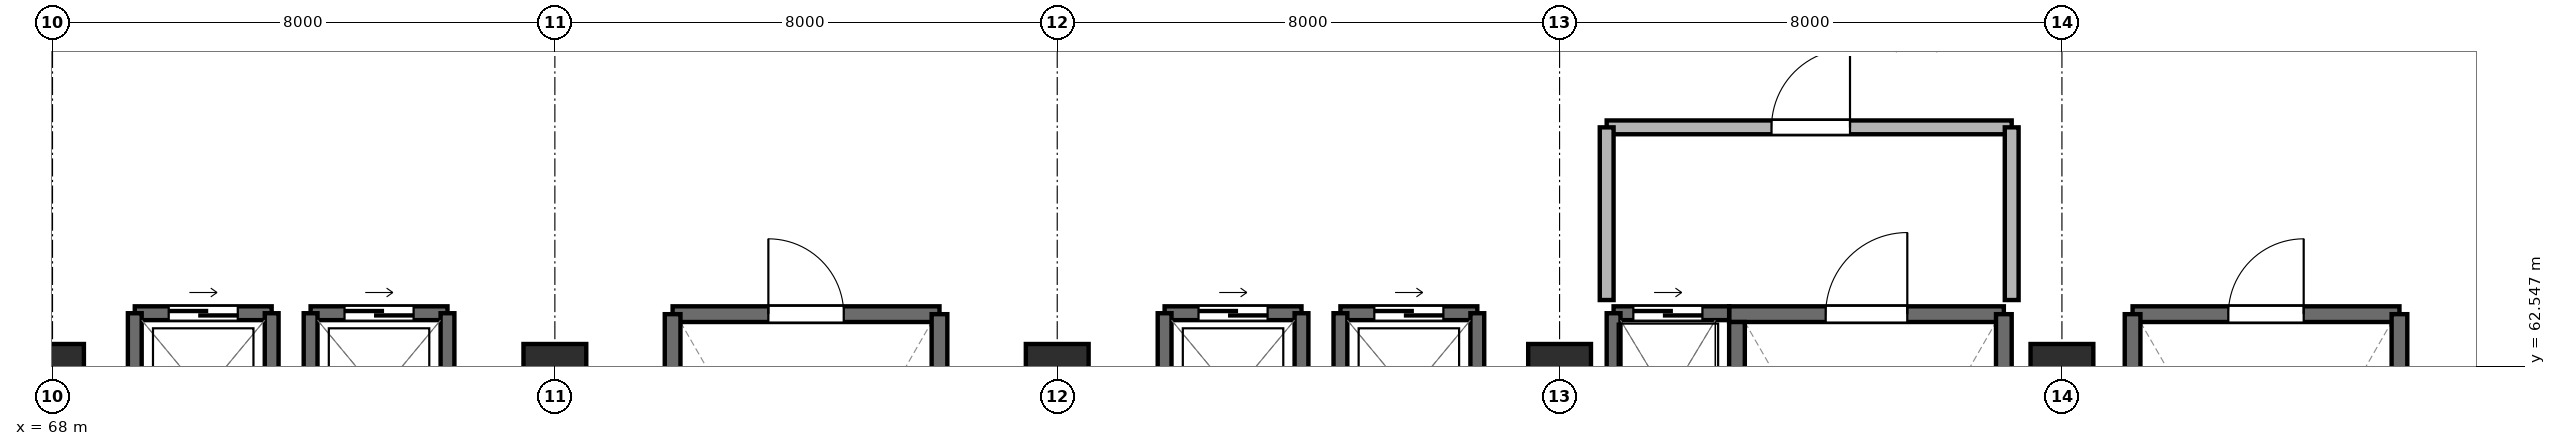
"""IFC4 building model, lengths in metres.
Left out: names, types, materials, properties, quantities, classifications, styles, units other than length and angle.
Written with IfcOpenShell. Run it as: python <this file> out.ifc"""

import sys

from ifc_helpers import new_model, si_unit, direction, frame, frame_2d, origin, origin_2d, place, context, subcontext, project, spatial, rectangle, extrude, element, fill, save


model = new_model("IFC4")
c1 = context("Model", 3, precision=1e-05, world=origin(), true_north=direction((0.0, 1.0)))
c2 = subcontext(c1, "Body", "Model", "MODEL_VIEW")
j1 = project(units=[si_unit("LENGTHUNIT", "METRE"), si_unit("PLANEANGLEUNIT", "RADIAN")], contexts=[c1])
p1 = place(None, origin())
s1 = spatial("IfcSite", under=j1, at=p1, CompositionType="ELEMENT")
p2 = place(p1, origin())
s2 = spatial("IfcBuilding", under=s1, at=p2, CompositionType="ELEMENT")
p3 = place(p2, origin())
s3 = spatial("IfcBuildingStorey", under=s2, at=p3, CompositionType="ELEMENT", Elevation=0.0)
for number, where, z_axis, x_axis in (
    (1, (68.0, 62.4, -0.35), (0.0, 0.0, 1.0), (1.0, 0.0, 0.0)),
    (2, (76.0, 62.4, -0.35), (0.0, 0.0, 1.0), (1.0, 0.0, 0.0)),
    (3, (84.0, 62.4, -0.35), (0.0, 0.0, 1.0), (1.0, 0.0, 0.0)),
    (4, (92.0, 62.4, -0.35), (0.0, 0.0, 1.0), (1.0, 0.0, 0.0)),
    (5, (100.0, 62.4, -0.35), (0.0, 0.0, 1.0), (1.0, 0.0, 0.0)),
):
    element("IfcColumn", number, at=place(p3, frame(where, z_axis=z_axis, x_axis=x_axis)), inside=s3, PredefinedType="COLUMN", context=c2, shape_type="SweptSolid", body=[
        extrude(rectangle(XDim=1.0, YDim=1.0, at=origin_2d()), origin(), (0.0, 0.0, 1.0), 4.65),
    ])
p4 = place(p3, frame((99.075, 63.375, 0.0), z_axis=(0.0, 0.0, 1.0), x_axis=(-1.0, 0.0, 0.0)))
e6 = element("IfcWall", 6, at=p4, inside=s3, PredefinedType="SHEAR", context=c2, shape_type="SweptSolid", body=[
    extrude(rectangle(XDim=4.375, YDim=0.25, at=frame_2d((2.188, 0.0))), origin(), (0.0, 0.0, 1.0), 4.3),
])
p5 = place(p4, frame((1.538, 0.0, 0.0)))
e7 = element("IfcOpeningElement", 7, at=p5, cuts=e6, PredefinedType="OPENING", context=c2, shape_type="SweptSolid", body=[
    extrude(rectangle(XDim=1.3, YDim=2.2, at=frame_2d((0.65, 1.1))), frame((0.0, 0.137, 0.0), z_axis=(0.0, -1.0, 0.0), x_axis=(1.0, 0.0, 0.0)), (0.0, 0.0, 1.0), 0.274),
])
p6 = place(p3, frame((94.825, 63.25, 0.0), z_axis=(0.0, 0.0, 1.0), x_axis=(0.0, -1.0, 0.0)))
e8 = element("IfcWall", 8, at=p6, inside=s3, PredefinedType="SHEAR", context=c2, shape_type="SweptSolid", body=[
    extrude(rectangle(XDim=7.075, YDim=0.25, at=frame_2d((3.538, 0.0))), origin(), (0.0, 0.0, 1.0), 4.3),
])
p7 = place(p3, frame((99.075, 56.175, 0.0), z_axis=(0.0, 0.0, 1.0), x_axis=(0.0, 1.0, 0.0)))
e9 = element("IfcWall", 9, at=p7, inside=s3, PredefinedType="SHEAR", context=c2, shape_type="SweptSolid", body=[
    extrude(rectangle(XDim=7.2, YDim=0.25, at=frame_2d((3.6, 0.0))), origin(), (0.0, 0.0, 1.0), 4.3),
])
p8 = place(p3, frame((82.125, 63.375, 0.0), z_axis=(0.0, 0.0, 1.0), x_axis=(-1.0, 0.0, 0.0)))
e10 = element("IfcWall", 10, at=p8, inside=s3, PredefinedType="SHEAR", context=c2, shape_type="SweptSolid", body=[
    extrude(rectangle(XDim=4.25, YDim=0.25, at=frame_2d((2.125, 0.0))), origin(), (0.0, 0.0, 1.0), 4.3),
])
p9 = place(p8, frame((1.525, 0.0, 0.0)))
e11 = element("IfcOpeningElement", 11, at=p9, cuts=e10, PredefinedType="OPENING", context=c2, shape_type="SweptSolid", body=[
    extrude(rectangle(XDim=1.2, YDim=2.2, at=frame_2d((0.6, 1.1))), frame((0.0, 0.137, 0.0), z_axis=(0.0, -1.0, 0.0), x_axis=(1.0, 0.0, 0.0)), (0.0, 0.0, 1.0), 0.274),
])
for number, where, z_axis, x_axis in (
    (12, (77.875, 63.375, 0.0), (0.0, 0.0, 1.0), (0.0, -1.0, 0.0)),
    (13, (82.125, 56.175, 0.0), (0.0, 0.0, 1.0), (0.0, 1.0, 0.0)),
):
    element("IfcWall", number, at=place(p3, frame(where, z_axis=z_axis, x_axis=x_axis)), inside=s3, PredefinedType="SHEAR", context=c2, shape_type="SweptSolid", body=[
        extrude(rectangle(XDim=7.2, YDim=0.25, at=frame_2d((3.6, 0.0))), origin(), (0.0, 0.0, 1.0), 4.3),
    ])
p10 = place(p3, frame((105.375, 63.375, 0.0), z_axis=(0.0, 0.0, 1.0), x_axis=(-1.0, 0.0, 0.0)))
e14 = element("IfcWall", 14, at=p10, inside=s3, PredefinedType="SHEAR", context=c2, shape_type="SweptSolid", body=[
    extrude(rectangle(XDim=4.25, YDim=0.25, at=frame_2d((2.125, 0.0))), origin(), (0.0, 0.0, 1.0), 4.3),
])
p11 = place(p10, frame((1.525, 0.0, 0.0)))
e15 = element("IfcOpeningElement", 15, at=p11, cuts=e14, PredefinedType="OPENING", context=c2, shape_type="SweptSolid", body=[
    extrude(rectangle(XDim=1.2, YDim=2.2, at=frame_2d((0.6, 1.1))), frame((0.0, 0.137, 0.0), z_axis=(0.0, -1.0, 0.0), x_axis=(1.0, 0.0, 0.0)), (0.0, 0.0, 1.0), 0.274),
])
for number, where, z_axis, x_axis in (
    (16, (101.125, 63.375, 0.0), (0.0, 0.0, 1.0), (0.0, -1.0, 0.0)),
    (17, (105.375, 56.175, 0.0), (0.0, 0.0, 1.0), (0.0, 1.0, 0.0)),
):
    element("IfcWall", number, at=place(p3, frame(where, z_axis=z_axis, x_axis=x_axis)), inside=s3, PredefinedType="SHEAR", context=c2, shape_type="SweptSolid", body=[
        extrude(rectangle(XDim=7.2, YDim=0.25, at=frame_2d((3.6, 0.0))), origin(), (0.0, 0.0, 1.0), 4.3),
    ])
p12 = place(p3, frame((94.7, 63.39, 0.0), z_axis=(0.0, 0.0, 1.0), x_axis=(-1.0, 0.0, 0.0)))
e18 = element("IfcWall", 18, at=p12, inside=s3, PredefinedType="SHEAR", context=c2, shape_type="SweptSolid", body=[
    extrude(rectangle(XDim=1.84, YDim=0.22, at=frame_2d((0.92, 0.0))), origin(), (0.0, 0.0, 1.0), 4.3),
])
p13 = place(p12, frame((0.425, 0.0, 0.0)))
e19 = element("IfcOpeningElement", 19, at=p13, cuts=e18, PredefinedType="OPENING", context=c2, shape_type="SweptSolid", body=[
    extrude(rectangle(XDim=1.1, YDim=2.2, at=frame_2d((0.55, 1.1))), frame((0.0, 0.122, 0.0), z_axis=(0.0, -1.0, 0.0), x_axis=(1.0, 0.0, 0.0)), (0.0, 0.0, 1.0), 0.244),
])
p14 = place(p3, frame((92.86, 63.39, 0.0), z_axis=(0.0, 0.0, 1.0), x_axis=(0.0, -1.0, 0.0)))
e20 = element("IfcWall", 20, at=p14, inside=s3, PredefinedType="SHEAR", context=c2, shape_type="SweptSolid", body=[
    extrude(rectangle(XDim=2.73, YDim=0.22, at=frame_2d((1.365, 0.0))), origin(), (0.0, 0.0, 1.0), 4.3),
])
p15 = place(p3, frame((71.49, 63.39, 0.0), z_axis=(0.0, 0.0, 1.0), x_axis=(-1.0, 0.0, 0.0)))
e21 = element("IfcWall", 21, at=p15, inside=s3, PredefinedType="SHEAR", context=c2, shape_type="SweptSolid", body=[
    extrude(rectangle(XDim=2.18, YDim=0.22, at=frame_2d((1.09, 0.0))), origin(), (0.0, 0.0, 1.0), 4.3),
])
p16 = place(p15, frame((0.54, 0.0, 0.0)))
e22 = element("IfcOpeningElement", 22, at=p16, cuts=e21, PredefinedType="OPENING", context=c2, shape_type="SweptSolid", body=[
    extrude(rectangle(XDim=1.1, YDim=2.2, at=frame_2d((0.55, 1.1))), frame((0.0, 0.122, 0.0), z_axis=(0.0, -1.0, 0.0), x_axis=(1.0, 0.0, 0.0)), (0.0, 0.0, 1.0), 0.244),
])
for number, where, z_axis, x_axis in (
    (23, (69.31, 63.39, 0.0), (0.0, 0.0, 1.0), (0.0, -1.0, 0.0)),
    (24, (71.49, 60.81, 0.0), (0.0, 0.0, 1.0), (0.0, 1.0, 0.0)),
):
    element("IfcWall", number, at=place(p3, frame(where, z_axis=z_axis, x_axis=x_axis)), inside=s3, PredefinedType="SHEAR", context=c2, shape_type="SweptSolid", body=[
        extrude(rectangle(XDim=2.58, YDim=0.22, at=frame_2d((1.29, 0.0))), origin(), (0.0, 0.0, 1.0), 4.3),
    ])
p17 = place(p3, frame((74.29, 63.39, 0.0), z_axis=(0.0, 0.0, 1.0), x_axis=(-1.0, 0.0, 0.0)))
e25 = element("IfcWall", 25, at=p17, inside=s3, PredefinedType="SHEAR", context=c2, shape_type="SweptSolid", body=[
    extrude(rectangle(XDim=2.18, YDim=0.22, at=frame_2d((1.09, 0.0))), origin(), (0.0, 0.0, 1.0), 4.3),
])
p18 = place(p17, frame((0.54, 0.0, 0.0)))
e26 = element("IfcOpeningElement", 26, at=p18, cuts=e25, PredefinedType="OPENING", context=c2, shape_type="SweptSolid", body=[
    extrude(rectangle(XDim=1.1, YDim=2.2, at=frame_2d((0.55, 1.1))), frame((0.0, 0.122, 0.0), z_axis=(0.0, -1.0, 0.0), x_axis=(1.0, 0.0, 0.0)), (0.0, 0.0, 1.0), 0.244),
])
for number, where, z_axis, x_axis in (
    (27, (72.11, 63.39, 0.0), (0.0, 0.0, 1.0), (0.0, -1.0, 0.0)),
    (28, (74.29, 60.81, 0.0), (0.0, 0.0, 1.0), (0.0, 1.0, 0.0)),
):
    element("IfcWall", number, at=place(p3, frame(where, z_axis=z_axis, x_axis=x_axis)), inside=s3, PredefinedType="SHEAR", context=c2, shape_type="SweptSolid", body=[
        extrude(rectangle(XDim=2.58, YDim=0.22, at=frame_2d((1.29, 0.0))), origin(), (0.0, 0.0, 1.0), 4.3),
    ])
p19 = place(p3, frame((87.89, 63.39, 0.0), z_axis=(0.0, 0.0, 1.0), x_axis=(-1.0, 0.0, 0.0)))
e29 = element("IfcWall", 29, at=p19, inside=s3, PredefinedType="SHEAR", context=c2, shape_type="SweptSolid", body=[
    extrude(rectangle(XDim=2.18, YDim=0.22, at=frame_2d((1.09, 0.0))), origin(), (0.0, 0.0, 1.0), 4.3),
])
p20 = place(p19, frame((0.54, 0.0, 0.0)))
e30 = element("IfcOpeningElement", 30, at=p20, cuts=e29, PredefinedType="OPENING", context=c2, shape_type="SweptSolid", body=[
    extrude(rectangle(XDim=1.1, YDim=2.2, at=frame_2d((0.55, 1.1))), frame((0.0, 0.122, 0.0), z_axis=(0.0, -1.0, 0.0), x_axis=(1.0, 0.0, 0.0)), (0.0, 0.0, 1.0), 0.244),
])
for number, where, z_axis, x_axis in (
    (31, (85.71, 63.39, 0.0), (0.0, 0.0, 1.0), (0.0, -1.0, 0.0)),
    (32, (87.89, 60.81, 0.0), (0.0, 0.0, 1.0), (0.0, 1.0, 0.0)),
):
    element("IfcWall", number, at=place(p3, frame(where, z_axis=z_axis, x_axis=x_axis)), inside=s3, PredefinedType="SHEAR", context=c2, shape_type="SweptSolid", body=[
        extrude(rectangle(XDim=2.58, YDim=0.22, at=frame_2d((1.29, 0.0))), origin(), (0.0, 0.0, 1.0), 4.3),
    ])
p21 = place(p3, frame((90.69, 63.39, 0.0), z_axis=(0.0, 0.0, 1.0), x_axis=(-1.0, 0.0, 0.0)))
e33 = element("IfcWall", 33, at=p21, inside=s3, PredefinedType="SHEAR", context=c2, shape_type="SweptSolid", body=[
    extrude(rectangle(XDim=2.18, YDim=0.22, at=frame_2d((1.09, 0.0))), origin(), (0.0, 0.0, 1.0), 4.3),
])
p22 = place(p21, frame((0.54, 0.0, 0.0)))
e34 = element("IfcOpeningElement", 34, at=p22, cuts=e33, PredefinedType="OPENING", context=c2, shape_type="SweptSolid", body=[
    extrude(rectangle(XDim=1.1, YDim=2.2, at=frame_2d((0.55, 1.1))), frame((0.0, 0.122, 0.0), z_axis=(0.0, -1.0, 0.0), x_axis=(1.0, 0.0, 0.0)), (0.0, 0.0, 1.0), 0.244),
])
for number, where, z_axis, x_axis in (
    (35, (88.51, 63.39, 0.0), (0.0, 0.0, 1.0), (0.0, -1.0, 0.0)),
    (36, (90.69, 60.81, 0.0), (0.0, 0.0, 1.0), (0.0, 1.0, 0.0)),
):
    element("IfcWall", number, at=place(p3, frame(where, z_axis=z_axis, x_axis=x_axis)), inside=s3, PredefinedType="SHEAR", context=c2, shape_type="SweptSolid", body=[
        extrude(rectangle(XDim=2.58, YDim=0.22, at=frame_2d((1.29, 0.0))), origin(), (0.0, 0.0, 1.0), 4.3),
    ])
p23 = place(p3, frame((92.75, 66.35, 0.0), z_axis=(0.0, 0.0, 1.0), x_axis=(1.0, 0.0, 0.0)))
e37 = element("IfcWall", 37, at=p23, inside=s3, PredefinedType="PARTITIONING", context=c2, shape_type="SweptSolid", body=[
    extrude(rectangle(XDim=6.45, YDim=0.22, at=frame_2d((3.225, 0.0))), origin(), (0.0, 0.0, 1.0), 3.88),
])
p24 = place(p23, frame((2.625, 0.0, 0.0)))
e38 = element("IfcOpeningElement", 38, at=p24, cuts=e37, PredefinedType="OPENING", context=c2, shape_type="SweptSolid", body=[
    extrude(rectangle(XDim=1.25, YDim=2.2, at=frame_2d((0.625, 1.1))), frame((0.0, 0.122, 0.0), z_axis=(0.0, -1.0, 0.0), x_axis=(1.0, 0.0, 0.0)), (0.0, 0.0, 1.0), 0.244),
])
for number, where, z_axis, x_axis in (
    (39, (92.75, 63.6, 0.0), (0.0, 0.0, 1.0), (0.0, 1.0, 0.0)),
    (40, (99.2, 63.6, 0.0), (0.0, 0.0, 1.0), (0.0, 1.0, 0.0)),
):
    element("IfcWall", number, at=place(p3, frame(where, z_axis=z_axis, x_axis=x_axis)), inside=s3, PredefinedType="PARTITIONING", context=c2, shape_type="SweptSolid", body=[
        extrude(rectangle(XDim=2.75, YDim=0.22, at=frame_2d((1.375, 0.0))), origin(), (0.0, 0.0, 1.0), 3.88),
    ])
p25 = place(p5, frame((1.3, 0.0, 0.0), z_axis=(0.0, 0.0, 1.0), x_axis=(-1.0, 0.0, 0.0)))
e41 = element("IfcDoor", 41, at=p25, inside=s3, OperationType="SINGLE_SWING_LEFT", PredefinedType="DOOR", context=c2, shape_type="SweptSolid", body=[
    extrude(rectangle(XDim=1.3, YDim=2.2, at=frame_2d((0.65, 1.1))), frame((0.0, 0.025, 0.0), z_axis=(0.0, -1.0, 0.0), x_axis=(1.0, 0.0, 0.0)), (0.0, 0.0, 1.0), 0.05),
])
fill(e7, e41)
p26 = place(p9, frame((1.2, 0.0, 0.0), z_axis=(0.0, 0.0, 1.0), x_axis=(-1.0, 0.0, 0.0)))
e42 = element("IfcDoor", 42, at=p26, inside=s3, OperationType="SINGLE_SWING_RIGHT", PredefinedType="DOOR", context=c2, shape_type="SweptSolid", body=[
    extrude(rectangle(XDim=1.2, YDim=2.2, at=frame_2d((0.6, 1.1))), frame((0.0, 0.025, 0.0), z_axis=(0.0, -1.0, 0.0), x_axis=(1.0, 0.0, 0.0)), (0.0, 0.0, 1.0), 0.05),
])
fill(e11, e42)
p27 = place(p11, frame((1.2, 0.0, 0.0), z_axis=(0.0, 0.0, 1.0), x_axis=(-1.0, 0.0, 0.0)))
e43 = element("IfcDoor", 43, at=p27, inside=s3, OperationType="SINGLE_SWING_LEFT", PredefinedType="DOOR", context=c2, shape_type="SweptSolid", body=[
    extrude(rectangle(XDim=1.2, YDim=2.2, at=frame_2d((0.6, 1.1))), frame((0.0, 0.025, 0.0), z_axis=(0.0, -1.0, 0.0), x_axis=(1.0, 0.0, 0.0)), (0.0, 0.0, 1.0), 0.05),
])
fill(e15, e43)
p28 = place(p13, origin())
e44 = element("IfcDoor", 44, at=p28, inside=s3, OperationType="SLIDING_TO_LEFT", PredefinedType="DOOR", context=c2, shape_type="SweptSolid", body=[
    extrude(rectangle(XDim=1.1, YDim=2.2, at=frame_2d((0.55, 1.1))), frame((0.0, 0.025, 0.0), z_axis=(0.0, -1.0, 0.0), x_axis=(1.0, 0.0, 0.0)), (0.0, 0.0, 1.0), 0.05),
])
fill(e19, e44)
p29 = place(p16, origin())
e45 = element("IfcDoor", 45, at=p29, inside=s3, OperationType="SLIDING_TO_LEFT", PredefinedType="DOOR", context=c2, shape_type="SweptSolid", body=[
    extrude(rectangle(XDim=1.1, YDim=2.2, at=frame_2d((0.55, 1.1))), frame((0.0, 0.025, 0.0), z_axis=(0.0, -1.0, 0.0), x_axis=(1.0, 0.0, 0.0)), (0.0, 0.0, 1.0), 0.05),
])
fill(e22, e45)
p30 = place(p18, origin())
e46 = element("IfcDoor", 46, at=p30, inside=s3, OperationType="SLIDING_TO_LEFT", PredefinedType="DOOR", context=c2, shape_type="SweptSolid", body=[
    extrude(rectangle(XDim=1.1, YDim=2.2, at=frame_2d((0.55, 1.1))), frame((0.0, 0.025, 0.0), z_axis=(0.0, -1.0, 0.0), x_axis=(1.0, 0.0, 0.0)), (0.0, 0.0, 1.0), 0.05),
])
fill(e26, e46)
p31 = place(p20, origin())
e47 = element("IfcDoor", 47, at=p31, inside=s3, OperationType="SLIDING_TO_LEFT", PredefinedType="DOOR", context=c2, shape_type="SweptSolid", body=[
    extrude(rectangle(XDim=1.1, YDim=2.2, at=frame_2d((0.55, 1.1))), frame((0.0, 0.025, 0.0), z_axis=(0.0, -1.0, 0.0), x_axis=(1.0, 0.0, 0.0)), (0.0, 0.0, 1.0), 0.05),
])
fill(e30, e47)
p32 = place(p22, origin())
e48 = element("IfcDoor", 48, at=p32, inside=s3, OperationType="SLIDING_TO_LEFT", PredefinedType="DOOR", context=c2, shape_type="SweptSolid", body=[
    extrude(rectangle(XDim=1.1, YDim=2.2, at=frame_2d((0.55, 1.1))), frame((0.0, 0.025, 0.0), z_axis=(0.0, -1.0, 0.0), x_axis=(1.0, 0.0, 0.0)), (0.0, 0.0, 1.0), 0.05),
])
fill(e34, e48)
p33 = place(p24, origin())
e49 = element("IfcDoor", 49, at=p33, inside=s3, OperationType="SINGLE_SWING_RIGHT", PredefinedType="DOOR", context=c2, shape_type="SweptSolid", body=[
    extrude(rectangle(XDim=1.25, YDim=2.2, at=frame_2d((0.625, 1.1))), frame((0.0, 0.025, 0.0), z_axis=(0.0, -1.0, 0.0), x_axis=(1.0, 0.0, 0.0)), (0.0, 0.0, 1.0), 0.05),
])
fill(e38, e49)
save(model, sys.argv[1])
